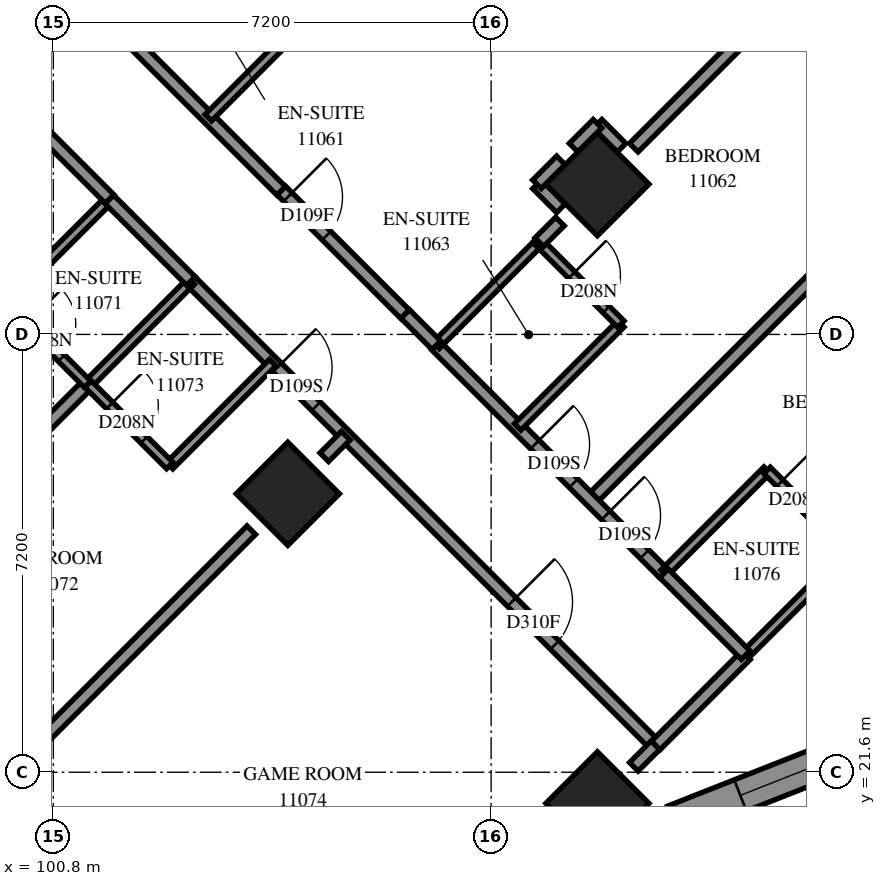
"""IFC4 building model, lengths in metres.
Left out: names, types, materials, properties, quantities, classifications, styles, units other than length and angle.
Written with IfcOpenShell. Run it as: python <this file> out.ifc"""

import sys

from ifc_helpers import new_model, si_unit, direction, frame, frame_2d, origin, origin_2d, place, context, subcontext, project, spatial, polyline, rectangle, outline, extrude, element, fill, save


model = new_model("IFC4")
c1 = context("Model", 3, precision=1e-05, world=origin(), true_north=direction((0.0, 1.0)))
c2 = subcontext(c1, "Body", "Model", "MODEL_VIEW")
j1 = project(units=[si_unit("LENGTHUNIT", "METRE"), si_unit("PLANEANGLEUNIT", "RADIAN")], contexts=[c1])
p1 = place(None, origin())
s1 = spatial("IfcSite", under=j1, at=p1, CompositionType="ELEMENT")
p2 = place(p1, origin())
s2 = spatial("IfcBuilding", under=s1, at=p2, CompositionType="ELEMENT")
p3 = place(p2, frame((0.0, 0.0, 44.0)))
s3 = spatial("IfcBuildingStorey", under=s2, at=p3, CompositionType="ELEMENT", Elevation=44.0)
for number, where, z_axis, x_axis in (
    (1, (109.747, 31.271, 0.0), (0.0, 0.0, 1.0), (0.707, -0.707, 0.0)),
    (2, (104.656, 26.18, 0.0), (0.0, 0.0, 1.0), (0.707, -0.707, 0.0)),
    (3, (109.747, 21.088, 0.0), (0.0, 0.0, 1.0), (0.707, -0.707, 0.0)),
):
    element("IfcColumn", number, at=place(p3, frame(where, z_axis=z_axis, x_axis=x_axis)), inside=s3, PredefinedType="COLUMN", context=c2, shape_type="SweptSolid", body=[
        extrude(rectangle(XDim=1.2, YDim=1.2, at=origin_2d()), origin(), (0.0, 0.0, 1.0), 3.1),
    ])
p4 = place(p3, frame((111.002, 20.787, 0.0), z_axis=(0.0, 0.0, 1.0), x_axis=(0.930334543, 0.3667119279, 0.0)))
e4 = element("IfcWall", 4, at=p4, inside=s3, PredefinedType="SOLIDWALL", context=c2, shape_type="SweptSolid", body=[
    extrude(outline(polyline([(0.119, -0.275), (5.64, -0.275), (5.39, 0.275), (-0.119, 0.275), (0.119, -0.275)])), origin(), (0.0, 0.0, 1.0), 3.1),
])
p5 = place(p4, frame((1.178, 0.0, 0.5)))
e5 = element("IfcOpeningElement", 5, at=p5, cuts=e4, PredefinedType="OPENING", context=c2, shape_type="SweptSolid", body=[
    extrude(rectangle(XDim=2.8, YDim=2.45, at=frame_2d((1.4, 1.225))), frame((0.0, 0.285, 0.0), z_axis=(0.0, -1.0, 0.0), x_axis=(1.0, 0.0, 0.0)), (0.0, 0.0, 1.0), 0.57),
])
p6 = place(p3, frame((103.061, 29.677, 0.0), z_axis=(0.0, 0.0, 1.0), x_axis=(0.7071067812, -0.7071067812, 0.0)))
e6 = element("IfcWall", 6, at=p6, inside=s3, PredefinedType="PARTITIONING", context=c2, shape_type="SweptSolid", body=[
    extrude(rectangle(XDim=10.802, YDim=0.2, at=frame_2d((5.401, 0.0))), origin(), (0.0, 0.0, 1.0), 3.1),
])
p7 = place(p6, frame((2.012, 0.0, 0.0)))
e7 = element("IfcOpeningElement", 7, at=p7, cuts=e6, PredefinedType="OPENING", context=c2, shape_type="SweptSolid", body=[
    extrude(rectangle(XDim=0.9, YDim=2.1, at=frame_2d((0.45, 1.05))), frame((0.0, 0.11, 0.0), z_axis=(0.0, -1.0, 0.0), x_axis=(1.0, 0.0, 0.0)), (0.0, 0.0, 1.0), 0.22),
])
p8 = place(p6, frame((7.463, 0.0, 0.0)))
e8 = element("IfcOpeningElement", 8, at=p8, cuts=e6, PredefinedType="OPENING", context=c2, shape_type="SweptSolid", body=[
    extrude(rectangle(XDim=1.0, YDim=2.1, at=frame_2d((0.5, 1.05))), frame((0.0, 0.11, 0.0), z_axis=(0.0, -1.0, 0.0), x_axis=(1.0, 0.0, 0.0)), (0.0, 0.0, 1.0), 0.22),
])
p9 = place(p3, frame((99.455, 36.253, 0.0), z_axis=(0.0, 0.0, 1.0), x_axis=(0.7071067812, -0.7071067812, 0.0)))
e9 = element("IfcWall", 9, at=p9, inside=s3, PredefinedType="PARTITIONING", context=c2, shape_type="SweptSolid", body=[
    extrude(rectangle(XDim=7.201, YDim=0.2, at=frame_2d((3.601, 0.0))), origin(), (0.0, 0.0, 1.0), 3.1),
])
p10 = place(p9, frame((0.401, 0.0, 0.0)))
e10 = element("IfcOpeningElement", 10, at=p10, cuts=e9, PredefinedType="OPENING", context=c2, shape_type="SweptSolid", body=[
    extrude(rectangle(XDim=0.9, YDim=2.1, at=frame_2d((0.45, 1.05))), frame((0.0, 0.11, 0.0), z_axis=(0.0, -1.0, 0.0), x_axis=(1.0, 0.0, 0.0)), (0.0, 0.0, 1.0), 0.22),
])
p11 = place(p3, frame((96.53, 23.146, 0.0), z_axis=(0.0, 0.0, 1.0), x_axis=(0.7071140909, 0.7070994714, 0.0)))
e11 = element("IfcWall", 11, at=p11, inside=s3, PredefinedType="PARTITIONING", context=c2, shape_type="SweptSolid", body=[
    extrude(rectangle(XDim=6.84, YDim=0.2, at=frame_2d((3.42, 0.0))), origin(), (0.0, 0.0, 1.0), 3.1),
])
p12 = place(p3, frame((109.64, 26.074, 0.0), z_axis=(0.0, 0.0, 1.0), x_axis=(0.7072538194, 0.7069597124, 0.0)))
e12 = element("IfcWall", 12, at=p12, inside=s3, PredefinedType="PARTITIONING", context=c2, shape_type="SweptSolid", body=[
    extrude(rectangle(XDim=6.8, YDim=0.2, at=frame_2d((3.4, 0.0))), origin(), (0.0, 0.0, 1.0), 3.1),
])
for number, where, z_axis, x_axis in (
    (13, (110.345, 31.871, 0.0), (0.0, 0.0, 1.0), (0.707, 0.707, 0.0)),
    (14, (100.163, 21.689, 0.0), (0.0, 0.0, 1.0), (0.707, 0.707, 0.0)),
):
    element("IfcWall", number, at=place(p3, frame(where, z_axis=z_axis, x_axis=x_axis)), inside=s3, PredefinedType="PARTITIONING", context=c2, shape_type="SweptSolid", body=[
        extrude(rectangle(XDim=5.504, YDim=0.2, at=frame_2d((2.752, 0.0))), origin(), (0.0, 0.0, 1.0), 3.1),
    ])
p13 = place(p3, frame((107.093, 28.615, 0.0), z_axis=(0.0, 0.0, 1.0), x_axis=(0.7072011313, -0.7070124185, 0.0)))
e15 = element("IfcWall", 15, at=p13, inside=s3, PredefinedType="PARTITIONING", context=c2, shape_type="SweptSolid", body=[
    extrude(rectangle(XDim=5.299, YDim=0.2, at=frame_2d((2.65, 0.0))), origin(), (0.0, 0.0, 1.0), 3.1),
])
p14 = place(p13, frame((2.299, 0.0, 0.0)))
e16 = element("IfcOpeningElement", 16, at=p14, cuts=e15, PredefinedType="OPENING", context=c2, shape_type="SweptSolid", body=[
    extrude(rectangle(XDim=0.9, YDim=2.1, at=frame_2d((0.45, 1.05))), frame((0.0, 0.11, 0.0), z_axis=(0.0, -1.0, 0.0), x_axis=(1.0, 0.0, 0.0)), (0.0, 0.0, 1.0), 0.22),
])
p15 = place(p13, frame((3.949, 0.0, 0.0)))
e17 = element("IfcOpeningElement", 17, at=p15, cuts=e15, PredefinedType="OPENING", context=c2, shape_type="SweptSolid", body=[
    extrude(rectangle(XDim=0.9, YDim=2.1, at=frame_2d((0.45, 1.05))), frame((0.0, 0.11, 0.0), z_axis=(0.0, -1.0, 0.0), x_axis=(1.0, 0.0, 0.0)), (0.0, 0.0, 1.0), 0.22),
])
p16 = place(p3, frame((104.551, 31.165, 0.0), z_axis=(0.0, 0.0, 1.0), x_axis=(0.7074545101, -0.7067588812, 0.0)))
e18 = element("IfcWall", 18, at=p16, inside=s3, PredefinedType="PARTITIONING", context=c2, shape_type="SweptSolid", body=[
    extrude(rectangle(XDim=2.875, YDim=0.2, at=frame_2d((1.438, 0.0))), origin(), (0.0, 0.0, 1.0), 3.1),
])
p17 = place(p16, frame((0.148, 0.0, 0.0)))
e19 = element("IfcOpeningElement", 19, at=p17, cuts=e18, PredefinedType="OPENING", context=c2, shape_type="SweptSolid", body=[
    extrude(rectangle(XDim=0.9, YDim=2.1, at=frame_2d((0.45, 1.05))), frame((0.0, 0.11, 0.0), z_axis=(0.0, -1.0, 0.0), x_axis=(1.0, 0.0, 0.0)), (0.0, 0.0, 1.0), 0.22),
])
p18 = place(p3, frame((100.023, 29.327, 0.0), z_axis=(0.0, 0.0, 1.0), x_axis=(0.7071067812, 0.7071067812, 0.0)))
e20 = element("IfcWall", 20, at=p18, inside=s3, PredefinedType="PARTITIONING", context=c2, shape_type="SweptSolid", body=[
    extrude(rectangle(XDim=2.401, YDim=0.15, at=frame_2d((1.201, 0.0))), origin(), (0.0, 0.0, 1.0), 3.1),
])
for number, where, z_axis, x_axis in (
    (21, (101.371, 27.979, 0.0), (0.0, 0.0, 1.0), (0.707, 0.708, 0.0)),
    (22, (108.435, 27.279, 0.0), (0.0, 0.0, 1.0), (0.708, 0.707, 0.0)),
    (23, (103.349, 32.365, 0.0), (0.0, 0.0, 1.0), (0.707, 0.708, 0.0)),
):
    element("IfcWall", number, at=place(p3, frame(where, z_axis=z_axis, x_axis=x_axis)), inside=s3, PredefinedType="PARTITIONING", context=c2, shape_type="SweptSolid", body=[
        extrude(rectangle(XDim=2.4, YDim=0.15, at=frame_2d((1.2, 0.0))), origin(), (0.0, 0.0, 1.0), 3.1),
    ])
p19 = place(p3, frame((112.183, 23.531, 0.0), z_axis=(0.0, 0.0, 1.0), x_axis=(0.7075233388, 0.706689978, 0.0)))
e24 = element("IfcWall", 24, at=p19, inside=s3, PredefinedType="PARTITIONING", context=c2, shape_type="SweptSolid", body=[
    extrude(rectangle(XDim=2.4, YDim=0.15, at=frame_2d((1.2, 0.0))), origin(), (0.0, 0.0, 1.0), 2.6),
])
for number, where, z_axis, x_axis in (
    (25, (102.711, 26.641, 0.0), (0.0, 0.0, 1.0), (0.707, 0.707, 0.0)),
    (26, (107.095, 28.621, 0.0), (0.0, 0.0, 1.0), (0.707, 0.707, 0.0)),
    (27, (110.843, 24.873, 0.0), (0.0, 0.0, 1.0), (0.707, 0.707, 0.0)),
):
    element("IfcWall", number, at=place(p3, frame(where, z_axis=z_axis, x_axis=x_axis)), inside=s3, PredefinedType="PARTITIONING", context=c2, shape_type="SweptSolid", body=[
        extrude(rectangle(XDim=2.398, YDim=0.15, at=frame_2d((1.199, 0.0))), origin(), (0.0, 0.0, 1.0), 3.1),
    ])
p20 = place(p3, frame((110.705, 22.039, 0.0), z_axis=(0.0, 0.0, 1.0), x_axis=(0.7066304548, 0.7075827869, 0.0)))
e28 = element("IfcWall", 28, at=p20, inside=s3, PredefinedType="PARTITIONING", context=c2, shape_type="SweptSolid", body=[
    extrude(rectangle(XDim=2.1, YDim=0.2, at=frame_2d((1.05, 0.0))), origin(), (0.0, 0.0, 1.0), 2.6),
])
p21 = place(p3, frame((100.021, 29.323, 0.0), z_axis=(0.0, 0.0, 1.0), x_axis=(0.7071067812, -0.7071067812, 0.0)))
e29 = element("IfcWall", 29, at=p21, inside=s3, PredefinedType="PARTITIONING", context=c2, shape_type="SweptSolid", body=[
    extrude(rectangle(XDim=1.901, YDim=0.15, at=frame_2d((0.95, 0.0))), origin(), (0.0, 0.0, 1.0), 3.1),
])
p22 = place(p21, frame((0.491, 0.0, 0.0)))
e30 = element("IfcOpeningElement", 30, at=p22, cuts=e29, PredefinedType="OPENING", context=c2, shape_type="SweptSolid", body=[
    extrude(rectangle(XDim=0.8, YDim=2.1, at=frame_2d((0.4, 1.05))), frame((0.0, 0.085, 0.0), z_axis=(0.0, -1.0, 0.0), x_axis=(1.0, 0.0, 0.0)), (0.0, 0.0, 1.0), 0.17),
])
p23 = place(p3, frame((108.789, 30.313, 0.0), z_axis=(0.0, 0.0, 1.0), x_axis=(0.7071067812, -0.7071067812, 0.0)))
e31 = element("IfcWall", 31, at=p23, inside=s3, PredefinedType="PARTITIONING", context=c2, shape_type="SweptSolid", body=[
    extrude(rectangle(XDim=1.901, YDim=0.15, at=frame_2d((0.95, 0.0))), origin(), (0.0, 0.0, 1.0), 3.1),
])
p24 = place(p23, frame((0.76, 0.0, 0.0)))
e32 = element("IfcOpeningElement", 32, at=p24, cuts=e31, PredefinedType="OPENING", context=c2, shape_type="SweptSolid", body=[
    extrude(rectangle(XDim=0.8, YDim=2.1, at=frame_2d((0.4, 1.05))), frame((0.0, 0.085, 0.0), z_axis=(0.0, -1.0, 0.0), x_axis=(1.0, 0.0, 0.0)), (0.0, 0.0, 1.0), 0.17),
])
p25 = place(p3, frame((112.537, 26.565, 0.0), z_axis=(0.0, 0.0, 1.0), x_axis=(0.7071067812, -0.7071067812, 0.0)))
e33 = element("IfcWall", 33, at=p25, inside=s3, PredefinedType="PARTITIONING", context=c2, shape_type="SweptSolid", body=[
    extrude(rectangle(XDim=1.901, YDim=0.15, at=frame_2d((0.95, 0.0))), origin(), (0.0, 0.0, 1.0), 3.1),
])
p26 = place(p25, frame((0.297, 0.0, 0.0)))
e34 = element("IfcOpeningElement", 34, at=p26, cuts=e33, PredefinedType="OPENING", context=c2, shape_type="SweptSolid", body=[
    extrude(rectangle(XDim=0.8, YDim=2.1, at=frame_2d((0.4, 1.05))), frame((0.0, 0.085, 0.0), z_axis=(0.0, -1.0, 0.0), x_axis=(1.0, 0.0, 0.0)), (0.0, 0.0, 1.0), 0.17),
])
p27 = place(p3, frame((110.843, 24.871, 0.0), z_axis=(0.0, 0.0, 1.0), x_axis=(0.7065800724, -0.7076330979, 0.0)))
e35 = element("IfcWall", 35, at=p27, inside=s3, PredefinedType="PARTITIONING", context=c2, shape_type="SweptSolid", body=[
    extrude(rectangle(XDim=1.899, YDim=0.2, at=frame_2d((0.95, 0.0))), origin(), (0.0, 0.0, 1.0), 3.1),
])
p28 = place(p3, frame((101.371, 27.985, 0.0), z_axis=(0.0, 0.0, 1.0), x_axis=(0.7076330979, -0.7065800724, 0.0)))
e36 = element("IfcWall", 36, at=p28, inside=s3, PredefinedType="PARTITIONING", context=c2, shape_type="SweptSolid", body=[
    extrude(rectangle(XDim=1.899, YDim=0.15, at=frame_2d((0.95, 0.0))), origin(), (0.0, 0.0, 1.0), 3.1),
])
p29 = place(p28, frame((0.501, 0.0, 0.0)))
e37 = element("IfcOpeningElement", 37, at=p29, cuts=e36, PredefinedType="OPENING", context=c2, shape_type="SweptSolid", body=[
    extrude(rectangle(XDim=0.8, YDim=2.1, at=frame_2d((0.4, 1.05))), frame((0.0, 0.085, 0.0), z_axis=(0.0, -1.0, 0.0), x_axis=(1.0, 0.0, 0.0)), (0.0, 0.0, 1.0), 0.17),
])
p30 = place(p3, frame((101.72, 31.022, 0.0), z_axis=(0.0, 0.0, 1.0), x_axis=(0.7065800724, -0.7076330979, 0.0)))
e38 = element("IfcWall", 38, at=p30, inside=s3, PredefinedType="PARTITIONING", context=c2, shape_type="SweptSolid", body=[
    extrude(rectangle(XDim=1.899, YDim=0.2, at=frame_2d((0.95, 0.0))), origin(), (0.0, 0.0, 1.0), 3.1),
])
p31 = place(p3, frame((100.523, 32.229, 0.0), z_axis=(0.0, 0.0, 1.0), x_axis=(0.7071067812, -0.7071067812, 0.0)))
e39 = element("IfcWall", 39, at=p31, inside=s3, PredefinedType="PARTITIONING", context=c2, shape_type="SweptSolid", body=[
    extrude(rectangle(XDim=1.7, YDim=0.2, at=frame_2d((0.85, 0.0))), origin(), (0.0, 0.0, 1.0), 3.1),
])
p32 = place(p3, frame((106.587, 29.135, 0.0), z_axis=(0.0, 0.0, 1.0), x_axis=(0.7071067812, -0.7071067812, 0.0)))
e40 = element("IfcWall", 40, at=p32, inside=s3, PredefinedType="PARTITIONING", context=c2, shape_type="SweptSolid", body=[
    extrude(rectangle(XDim=0.724, YDim=0.2, at=frame_2d((0.362, 0.0))), origin(), (0.0, 0.0, 1.0), 3.1),
])
for number, where, z_axis, x_axis in (
    (41, (108.754, 31.268, 0.0), (0.0, 0.0, 1.0), (0.707, -0.707, 0.0)),
    (42, (109.751, 32.265, 0.0), (0.0, 0.0, 1.0), (0.707, -0.707, 0.0)),
    (43, (109.355, 31.871, 0.0), (0.0, 0.0, 1.0), (0.707, 0.707, 0.0)),
    (44, (108.753, 31.269, 0.0), (0.0, 0.0, 1.0), (0.707, 0.707, 0.0)),
):
    element("IfcWall", number, at=place(p3, frame(where, z_axis=z_axis, x_axis=x_axis)), inside=s3, PredefinedType="PARTITIONING", context=c2, shape_type="SweptSolid", body=[
        extrude(rectangle(XDim=0.557, YDim=0.2, at=frame_2d((0.279, 0.0))), origin(), (0.0, 0.0, 1.0), 3.1),
    ])
p33 = place(p3, frame((105.255, 26.781, 0.0), z_axis=(0.0, 0.0, 1.0), x_axis=(0.7071067812, 0.7071067812, 0.0)))
e45 = element("IfcWall", 45, at=p33, inside=s3, PredefinedType="PARTITIONING", context=c2, shape_type="SweptSolid", body=[
    extrude(rectangle(XDim=0.501, YDim=0.2, at=frame_2d((0.25, 0.0))), origin(), (0.0, 0.0, 1.0), 3.1),
])
p34 = place(p3, frame((110.347, 21.689, 0.0), z_axis=(0.0, 0.0, 1.0), x_axis=(0.7071067812, 0.7071067812, 0.0)))
e46 = element("IfcWall", 46, at=p34, inside=s3, PredefinedType="PARTITIONING", context=c2, shape_type="SweptSolid", body=[
    extrude(rectangle(XDim=0.501, YDim=0.2, at=frame_2d((0.25, 0.0))), origin(), (0.0, 0.0, 1.0), 2.6),
])
p35 = place(p3, frame((108.791, 30.317, 0.0), z_axis=(0.0, 0.0, 1.0), x_axis=(0.7071067812, 0.7071067812, 0.0)))
e47 = element("IfcWall", 47, at=p35, inside=s3, PredefinedType="PARTITIONING", context=c2, shape_type="SweptSolid", body=[
    extrude(rectangle(XDim=0.481, YDim=0.2, at=frame_2d((0.24, 0.0))), origin(), (0.0, 0.0, 1.0), 3.1),
])
p36 = place(p5, origin())
e48 = element("IfcWindow", 48, at=p36, inside=s3, PartitioningType="SINGLE_PANEL", PredefinedType="WINDOW", context=c2, shape_type="SweptSolid", body=[
    extrude(rectangle(XDim=2.8, YDim=2.45, at=frame_2d((1.4, 1.225))), frame((0.0, 0.155, 0.0), z_axis=(0.0, -1.0, 0.0), x_axis=(1.0, 0.0, 0.0)), (0.0, 0.0, 1.0), 0.06),
])
fill(e5, e48)
p37 = place(p17, origin())
e49 = element("IfcDoor", 49, at=p37, inside=s3, OperationType="SINGLE_SWING_LEFT", PredefinedType="DOOR", context=c2, shape_type="SweptSolid", body=[
    extrude(rectangle(XDim=0.9, YDim=2.1, at=frame_2d((0.45, 1.05))), frame((0.0, 0.025, 0.0), z_axis=(0.0, -1.0, 0.0), x_axis=(1.0, 0.0, 0.0)), (0.0, 0.0, 1.0), 0.05),
])
fill(e19, e49)
p38 = place(p14, origin())
e50 = element("IfcDoor", 50, at=p38, inside=s3, OperationType="SINGLE_SWING_LEFT", PredefinedType="DOOR", context=c2, shape_type="SweptSolid", body=[
    extrude(rectangle(XDim=0.9, YDim=2.1, at=frame_2d((0.45, 1.05))), frame((0.0, 0.025, 0.0), z_axis=(0.0, -1.0, 0.0), x_axis=(1.0, 0.0, 0.0)), (0.0, 0.0, 1.0), 0.05),
])
fill(e16, e50)
p39 = place(p24, origin())
e51 = element("IfcDoor", 51, at=p39, inside=s3, OperationType="SINGLE_SWING_RIGHT", PredefinedType="DOOR", context=c2, shape_type="SweptSolid", body=[
    extrude(rectangle(XDim=0.8, YDim=2.1, at=frame_2d((0.4, 1.05))), frame((0.0, 0.025, 0.0), z_axis=(0.0, -1.0, 0.0), x_axis=(1.0, 0.0, 0.0)), (0.0, 0.0, 1.0), 0.05),
])
fill(e32, e51)
p40 = place(p22, origin())
e52 = element("IfcDoor", 52, at=p40, inside=s3, OperationType="SINGLE_SWING_RIGHT", PredefinedType="DOOR", context=c2, shape_type="SweptSolid", body=[
    extrude(rectangle(XDim=0.8, YDim=2.1, at=frame_2d((0.4, 1.05))), frame((0.0, 0.025, 0.0), z_axis=(0.0, -1.0, 0.0), x_axis=(1.0, 0.0, 0.0)), (0.0, 0.0, 1.0), 0.05),
])
fill(e30, e52)
p41 = place(p7, origin())
e53 = element("IfcDoor", 53, at=p41, inside=s3, OperationType="SINGLE_SWING_LEFT", PredefinedType="DOOR", context=c2, shape_type="SweptSolid", body=[
    extrude(rectangle(XDim=0.9, YDim=2.1, at=frame_2d((0.45, 1.05))), frame((0.0, 0.025, 0.0), z_axis=(0.0, -1.0, 0.0), x_axis=(1.0, 0.0, 0.0)), (0.0, 0.0, 1.0), 0.05),
])
fill(e7, e53)
p42 = place(p29, origin())
e54 = element("IfcDoor", 54, at=p42, inside=s3, OperationType="SINGLE_SWING_RIGHT", PredefinedType="DOOR", context=c2, shape_type="SweptSolid", body=[
    extrude(rectangle(XDim=0.8, YDim=2.1, at=frame_2d((0.4, 1.05))), frame((0.0, 0.025, 0.0), z_axis=(0.0, -1.0, 0.0), x_axis=(1.0, 0.0, 0.0)), (0.0, 0.0, 1.0), 0.05),
])
fill(e37, e54)
p43 = place(p8, origin())
e55 = element("IfcDoor", 55, at=p43, inside=s3, OperationType="SINGLE_SWING_RIGHT", PredefinedType="DOOR", context=c2, shape_type="SweptSolid", body=[
    extrude(rectangle(XDim=1.0, YDim=2.1, at=frame_2d((0.5, 1.05))), frame((0.0, 0.025, 0.0), z_axis=(0.0, -1.0, 0.0), x_axis=(1.0, 0.0, 0.0)), (0.0, 0.0, 1.0), 0.05),
])
fill(e8, e55)
p44 = place(p15, origin())
e56 = element("IfcDoor", 56, at=p44, inside=s3, OperationType="SINGLE_SWING_RIGHT", PredefinedType="DOOR", context=c2, shape_type="SweptSolid", body=[
    extrude(rectangle(XDim=0.9, YDim=2.1, at=frame_2d((0.45, 1.05))), frame((0.0, 0.025, 0.0), z_axis=(0.0, -1.0, 0.0), x_axis=(1.0, 0.0, 0.0)), (0.0, 0.0, 1.0), 0.05),
])
fill(e17, e56)
p45 = place(p26, origin())
e57 = element("IfcDoor", 57, at=p45, inside=s3, OperationType="SINGLE_SWING_RIGHT", PredefinedType="DOOR", context=c2, shape_type="SweptSolid", body=[
    extrude(rectangle(XDim=0.8, YDim=2.1, at=frame_2d((0.4, 1.05))), frame((0.0, 0.025, 0.0), z_axis=(0.0, -1.0, 0.0), x_axis=(1.0, 0.0, 0.0)), (0.0, 0.0, 1.0), 0.05),
])
fill(e34, e57)
save(model, sys.argv[1])
